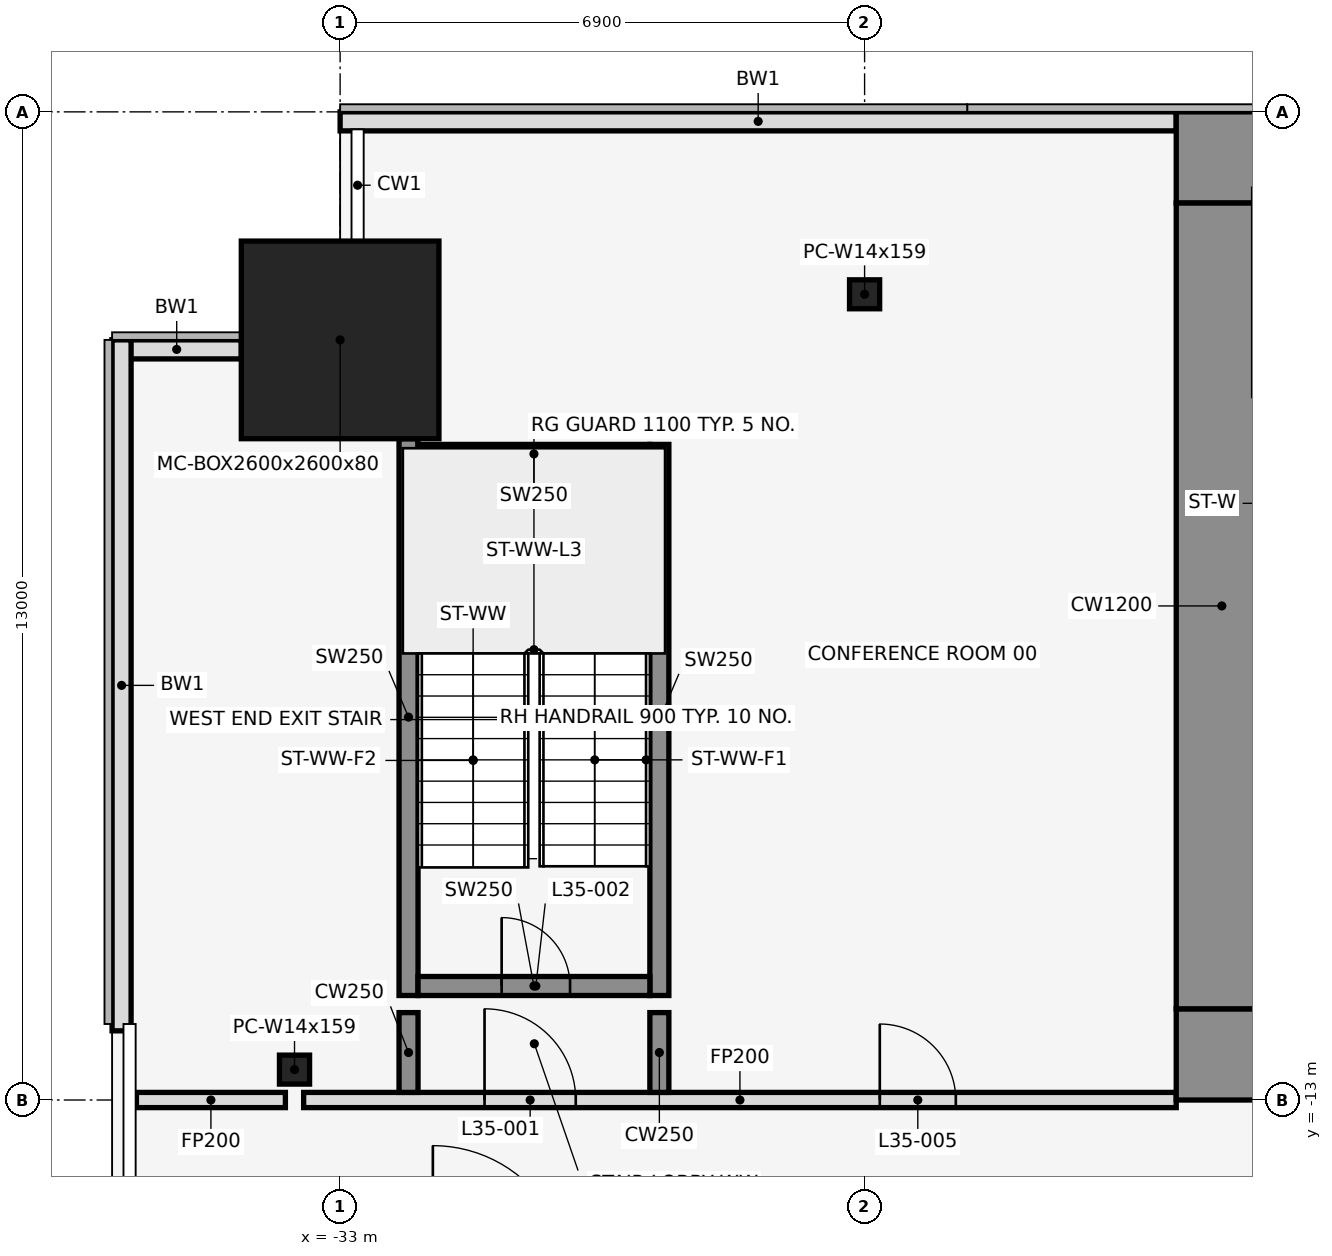
"""IFC4 building model, lengths in metres.
Left out: names, types, materials, properties, quantities, classifications, styles, units other than length and angle.
Written with IfcOpenShell. Run it as: python <this file> out.ifc"""

import sys

from ifc_helpers import new_model, si_unit, direction, frame, frame_2d, origin, origin_2d, place, context, subcontext, project, spatial, rectangle, hollow_rectangle, i_section, extrude, element, fill, save


model = new_model("IFC4")
c1 = context("Model", 3, precision=1e-05, world=origin(), true_north=direction((0.0, 1.0)))
c2 = subcontext(c1, "Body", "Model", "MODEL_VIEW")
j1 = project(units=[si_unit("LENGTHUNIT", "METRE"), si_unit("PLANEANGLEUNIT", "RADIAN")], contexts=[c1])
p1 = place(None, origin())
s1 = spatial("IfcSite", under=j1, at=p1, CompositionType="ELEMENT")
p2 = place(p1, origin())
s2 = spatial("IfcBuilding", under=s1, at=p2, CompositionType="ELEMENT")
p3 = place(p2, frame((0.0, 0.0, 160.9)))
s3 = spatial("IfcBuildingStorey", under=s2, at=p3, CompositionType="ELEMENT", Elevation=160.9)
p4 = place(p3, frame((-33.0, -3.0, 0.0), z_axis=(0.0, 0.0, 1.0), x_axis=(1.0, 0.0, 0.0)))
e1 = element("IfcColumn", 1, at=p4, inside=s3, PredefinedType="COLUMN", context=c2, shape_type="SweptSolid", body=[
    extrude(hollow_rectangle(XDim=2.6, YDim=2.6, WallThickness=0.08, at=origin_2d()), origin(), (0.0, 0.0, 1.0), 4.1),
])
for number, where, z_axis, x_axis in (
    (2, (-26.1, -2.4, 0.0), (0.0, 0.0, 1.0), (1.0, 0.0, 0.0)),
    (3, (-33.6, -12.6, 0.0), (0.0, 0.0, 1.0), (1.0, 0.0, 0.0)),
):
    element("IfcColumn", number, at=place(p3, frame(where, z_axis=z_axis, x_axis=x_axis)), inside=s3, PredefinedType="COLUMN", context=c2, shape_type="SweptSolid", body=[
        extrude(i_section(OverallWidth=0.396, OverallDepth=0.381, WebThickness=0.019, FlangeThickness=0.03, at=origin_2d()), origin(), (0.0, 0.0, 1.0), 4.1),
    ])
p5 = place(p3, frame((-22.0, -0.125, 0.0), z_axis=(0.0, 0.0, 1.0), x_axis=(-1.0, 0.0, 0.0)))
e4 = element("IfcWall", 4, at=p5, inside=s3, PredefinedType="STANDARD", context=c2, shape_type="SweptSolid", body=[
    extrude(rectangle(XDim=11.0, YDim=0.25, at=frame_2d((5.5, 0.0))), origin(), (0.0, 0.0, 1.0), 3.95),
])
p6 = place(p3, frame((-34.3, -3.125, 0.0), z_axis=(0.0, 0.0, 1.0), x_axis=(-1.0, 0.0, 0.0)))
e5 = element("IfcWall", 5, at=p6, inside=s3, PredefinedType="STANDARD", context=c2, shape_type="SweptSolid", body=[
    extrude(rectangle(XDim=1.7, YDim=0.25, at=frame_2d((0.85, 0.0))), origin(), (0.0, 0.0, 1.0), 3.95),
])
p7 = place(p3, frame((-35.875, -3.0, 0.0), z_axis=(0.0, 0.0, 1.0), x_axis=(0.0, -1.0, 0.0)))
e6 = element("IfcWall", 6, at=p7, inside=s3, PredefinedType="STANDARD", context=c2, shape_type="SweptSolid", body=[
    extrude(rectangle(XDim=9.09, YDim=0.25, at=frame_2d((4.545, 0.0))), origin(), (0.0, 0.0, 1.0), 3.95),
])
p8 = place(p3, frame((-32.1, -11.625, 0.0), z_axis=(0.0, 0.0, 1.0), x_axis=(0.0, 1.0, 0.0)))
e7 = element("IfcWall", 7, at=p8, inside=s3, PredefinedType="SHEAR", context=c2, shape_type="SweptSolid", body=[
    extrude(rectangle(XDim=7.325, YDim=0.25, at=frame_2d((3.663, 0.0))), origin(), (0.0, 0.0, 1.0), 4.1),
])
p9 = place(p3, frame((-28.8, -11.625, 0.0), z_axis=(0.0, 0.0, 1.0), x_axis=(0.0, 1.0, 0.0)))
e8 = element("IfcWall", 8, at=p9, inside=s3, PredefinedType="SHEAR", context=c2, shape_type="SweptSolid", body=[
    extrude(rectangle(XDim=7.25, YDim=0.25, at=frame_2d((3.625, 0.0))), origin(), (0.0, 0.0, 1.0), 4.1),
])
p10 = place(p3, frame((-31.975, -11.5, 0.0), z_axis=(0.0, 0.0, 1.0), x_axis=(1.0, 0.0, 0.0)))
e9 = element("IfcWall", 9, at=p10, inside=s3, PredefinedType="SHEAR", context=c2, shape_type="SweptSolid", body=[
    extrude(rectangle(XDim=3.05, YDim=0.25, at=frame_2d((1.525, 0.0))), origin(), (0.0, 0.0, 1.0), 4.1),
])
p11 = place(p10, frame((1.1, 0.0, 0.0)))
e10 = element("IfcOpeningElement", 10, at=p11, cuts=e9, PredefinedType="OPENING", context=c2, shape_type="SweptSolid", body=[
    extrude(rectangle(XDim=0.9, YDim=2.1, at=frame_2d((0.45, 1.05))), frame((0.0, 0.137, 0.0), z_axis=(0.0, -1.0, 0.0), x_axis=(1.0, 0.0, 0.0)), (0.0, 0.0, 1.0), 0.274),
])
p12 = place(p3, frame((-31.975, -4.5, 0.0), z_axis=(0.0, 0.0, 1.0), x_axis=(1.0, 0.0, 0.0)))
e11 = element("IfcWall", 11, at=p12, inside=s3, PredefinedType="SHEAR", context=c2, shape_type="SweptSolid", body=[
    extrude(rectangle(XDim=3.05, YDim=0.25, at=frame_2d((1.525, 0.0))), origin(), (0.0, 0.0, 1.0), 4.1),
])
p13 = place(p3, frame((-35.68, -13.0, 0.0), z_axis=(0.0, 0.0, 1.0), x_axis=(1.0, 0.0, 0.0)))
e12 = element("IfcWall", 12, at=p13, inside=s3, PredefinedType="PARTITIONING", context=c2, shape_type="SweptSolid", body=[
    extrude(rectangle(XDim=1.96, YDim=0.2, at=frame_2d((0.98, 0.0))), origin(), (0.0, 0.0, 1.0), 2.841),
])
p14 = place(p3, frame((-33.48, -13.0, 0.0), z_axis=(0.0, 0.0, 1.0), x_axis=(1.0, 0.0, 0.0)))
e13 = element("IfcWall", 13, at=p14, inside=s3, PredefinedType="PARTITIONING", context=c2, shape_type="SweptSolid", body=[
    extrude(rectangle(XDim=11.48, YDim=0.2, at=frame_2d((5.74, 0.0))), origin(), (0.0, 0.0, 1.0), 2.841),
])
p15 = place(p14, frame((2.38, 0.0, 0.0)))
e14 = element("IfcOpeningElement", 14, at=p15, cuts=e13, PredefinedType="OPENING", context=c2, shape_type="SweptSolid", body=[
    extrude(rectangle(XDim=1.2, YDim=2.1, at=frame_2d((0.6, 1.05))), frame((0.0, 0.112, 0.0), z_axis=(0.0, -1.0, 0.0), x_axis=(1.0, 0.0, 0.0)), (0.0, 0.0, 1.0), 0.224),
])
p16 = place(p14, frame((7.58, 0.0, 0.0)))
e15 = element("IfcOpeningElement", 15, at=p16, cuts=e13, PredefinedType="OPENING", context=c2, shape_type="SweptSolid", body=[
    extrude(rectangle(XDim=1.0, YDim=2.1, at=frame_2d((0.5, 1.05))), frame((0.0, 0.112, 0.0), z_axis=(0.0, -1.0, 0.0), x_axis=(1.0, 0.0, 0.0)), (0.0, 0.0, 1.0), 0.224),
])
for number, where, z_axis, x_axis in (
    (16, (-32.1, -12.9, 0.0), (0.0, 0.0, 1.0), (0.0, 1.0, 0.0)),
    (17, (-28.8, -12.9, 0.0), (0.0, 0.0, 1.0), (0.0, 1.0, 0.0)),
):
    element("IfcWall", number, at=place(p3, frame(where, z_axis=z_axis, x_axis=x_axis)), inside=s3, PredefinedType="SHEAR", context=c2, shape_type="SweptSolid", body=[
        extrude(rectangle(XDim=1.05, YDim=0.25, at=frame_2d((0.525, 0.0))), origin(), (0.0, 0.0, 1.0), 4.1),
    ])
p17 = place(p3, frame((-22.0, -0.6, 0.0), z_axis=(0.0, 0.0, 1.0), x_axis=(1.0, 0.0, 0.0)))
e18 = element("IfcWall", 18, at=p17, inside=s3, PredefinedType="SHEAR", context=c2, shape_type="SweptSolid", body=[
    extrude(rectangle(XDim=44.0, YDim=1.2, at=frame_2d((22.0, 0.0))), origin(), (0.0, 0.0, 1.0), 4.1),
])
p18 = place(p17, frame((18.55, 0.0, 0.0)))
e19 = element("IfcOpeningElement", 19, at=p18, cuts=e18, PredefinedType="OPENING", context=c2, shape_type="SweptSolid", body=[
    extrude(rectangle(XDim=0.9, YDim=2.1, at=frame_2d((0.45, 1.05))), frame((0.0, 0.612, 0.0), z_axis=(0.0, -1.0, 0.0), x_axis=(1.0, 0.0, 0.0)), (0.0, 0.0, 1.0), 1.224),
])
p19 = place(p17, frame((24.55, 0.0, 0.0)))
e20 = element("IfcOpeningElement", 20, at=p19, cuts=e18, PredefinedType="OPENING", context=c2, shape_type="SweptSolid", body=[
    extrude(rectangle(XDim=0.9, YDim=2.1, at=frame_2d((0.45, 1.05))), frame((0.0, 0.612, 0.0), z_axis=(0.0, -1.0, 0.0), x_axis=(1.0, 0.0, 0.0)), (0.0, 0.0, 1.0), 1.224),
])
p20 = place(p3, frame((-22.0, -12.4, 0.0), z_axis=(0.0, 0.0, 1.0), x_axis=(1.0, 0.0, 0.0)))
e21 = element("IfcWall", 21, at=p20, inside=s3, PredefinedType="SHEAR", context=c2, shape_type="SweptSolid", body=[
    extrude(rectangle(XDim=44.0, YDim=1.2, at=frame_2d((22.0, 0.0))), origin(), (0.0, 0.0, 1.0), 4.1),
])
p21 = place(p20, frame((2.2, 0.0, 0.0)))
e22 = element("IfcOpeningElement", 22, at=p21, cuts=e21, PredefinedType="OPENING", context=c2, shape_type="SweptSolid", body=[
    extrude(rectangle(XDim=1.2, YDim=2.1, at=frame_2d((0.6, 1.05))), frame((0.0, 0.612, 0.0), z_axis=(0.0, -1.0, 0.0), x_axis=(1.0, 0.0, 0.0)), (0.0, 0.0, 1.0), 1.224),
])
p22 = place(p20, frame((21.4, 0.0, 0.0)))
e23 = element("IfcOpeningElement", 23, at=p22, cuts=e21, PredefinedType="OPENING", context=c2, shape_type="SweptSolid", body=[
    extrude(rectangle(XDim=1.2, YDim=2.1, at=frame_2d((0.6, 1.05))), frame((0.0, 0.612, 0.0), z_axis=(0.0, -1.0, 0.0), x_axis=(1.0, 0.0, 0.0)), (0.0, 0.0, 1.0), 1.224),
])
p23 = place(p20, frame((40.6, 0.0, 0.0)))
e24 = element("IfcOpeningElement", 24, at=p23, cuts=e21, PredefinedType="OPENING", context=c2, shape_type="SweptSolid", body=[
    extrude(rectangle(XDim=1.2, YDim=2.1, at=frame_2d((0.6, 1.05))), frame((0.0, 0.612, 0.0), z_axis=(0.0, -1.0, 0.0), x_axis=(1.0, 0.0, 0.0)), (0.0, 0.0, 1.0), 1.224),
])
p24 = place(p20, frame((16.0, 0.0, 0.0)))
e25 = element("IfcOpeningElement", 25, at=p24, cuts=e21, PredefinedType="OPENING", context=c2, shape_type="SweptSolid", body=[
    extrude(rectangle(XDim=1.8, YDim=2.1, at=frame_2d((0.9, 1.05))), frame((0.0, 0.612, 0.0), z_axis=(0.0, -1.0, 0.0), x_axis=(1.0, 0.0, 0.0)), (0.0, 0.0, 1.0), 1.224),
])
p25 = place(p20, frame((6.3, 0.0, 0.0)))
e26 = element("IfcOpeningElement", 26, at=p25, cuts=e21, PredefinedType="OPENING", context=c2, shape_type="SweptSolid", body=[
    extrude(rectangle(XDim=1.2, YDim=2.1, at=frame_2d((0.6, 1.05))), frame((0.0, 0.612, 0.0), z_axis=(0.0, -1.0, 0.0), x_axis=(1.0, 0.0, 0.0)), (0.0, 0.0, 1.0), 1.224),
])
p26 = place(p20, frame((26.2, 0.0, 0.0)))
e27 = element("IfcOpeningElement", 27, at=p26, cuts=e21, PredefinedType="OPENING", context=c2, shape_type="SweptSolid", body=[
    extrude(rectangle(XDim=1.8, YDim=2.1, at=frame_2d((0.9, 1.05))), frame((0.0, 0.612, 0.0), z_axis=(0.0, -1.0, 0.0), x_axis=(1.0, 0.0, 0.0)), (0.0, 0.0, 1.0), 1.224),
])
p27 = place(p20, frame((36.5, 0.0, 0.0)))
e28 = element("IfcOpeningElement", 28, at=p27, cuts=e21, PredefinedType="OPENING", context=c2, shape_type="SweptSolid", body=[
    extrude(rectangle(XDim=1.2, YDim=2.1, at=frame_2d((0.6, 1.05))), frame((0.0, 0.612, 0.0), z_axis=(0.0, -1.0, 0.0), x_axis=(1.0, 0.0, 0.0)), (0.0, 0.0, 1.0), 1.224),
])
p28 = place(p3, frame((-21.4, -11.8, 0.0), z_axis=(0.0, 0.0, 1.0), x_axis=(0.0, 1.0, 0.0)))
e29 = element("IfcWall", 29, at=p28, inside=s3, PredefinedType="SHEAR", context=c2, shape_type="SweptSolid", body=[
    extrude(rectangle(XDim=10.6, YDim=1.2, at=frame_2d((5.3, 0.0))), origin(), (0.0, 0.0, 1.0), 4.1),
])
p29 = place(p15, origin())
e30 = element("IfcDoor", 30, at=p29, inside=s3, OperationType="SINGLE_SWING_LEFT", PredefinedType="DOOR", context=c2, shape_type="SweptSolid", body=[
    extrude(rectangle(XDim=1.2, YDim=2.1, at=frame_2d((0.6, 1.05))), frame((0.0, 0.025, 0.0), z_axis=(0.0, -1.0, 0.0), x_axis=(1.0, 0.0, 0.0)), (0.0, 0.0, 1.0), 0.05),
])
fill(e14, e30)
p30 = place(p11, origin())
e31 = element("IfcDoor", 31, at=p30, inside=s3, OperationType="SINGLE_SWING_LEFT", PredefinedType="DOOR", context=c2, shape_type="SweptSolid", body=[
    extrude(rectangle(XDim=0.9, YDim=2.1, at=frame_2d((0.45, 1.05))), frame((0.0, 0.025, 0.0), z_axis=(0.0, -1.0, 0.0), x_axis=(1.0, 0.0, 0.0)), (0.0, 0.0, 1.0), 0.05),
])
fill(e10, e31)
p31 = place(p16, origin())
e32 = element("IfcDoor", 32, at=p31, inside=s3, OperationType="SINGLE_SWING_LEFT", PredefinedType="DOOR", context=c2, shape_type="SweptSolid", body=[
    extrude(rectangle(XDim=1.0, YDim=2.1, at=frame_2d((0.5, 1.05))), frame((0.0, 0.025, 0.0), z_axis=(0.0, -1.0, 0.0), x_axis=(1.0, 0.0, 0.0)), (0.0, 0.0, 1.0), 0.05),
])
fill(e15, e32)
save(model, sys.argv[1])
